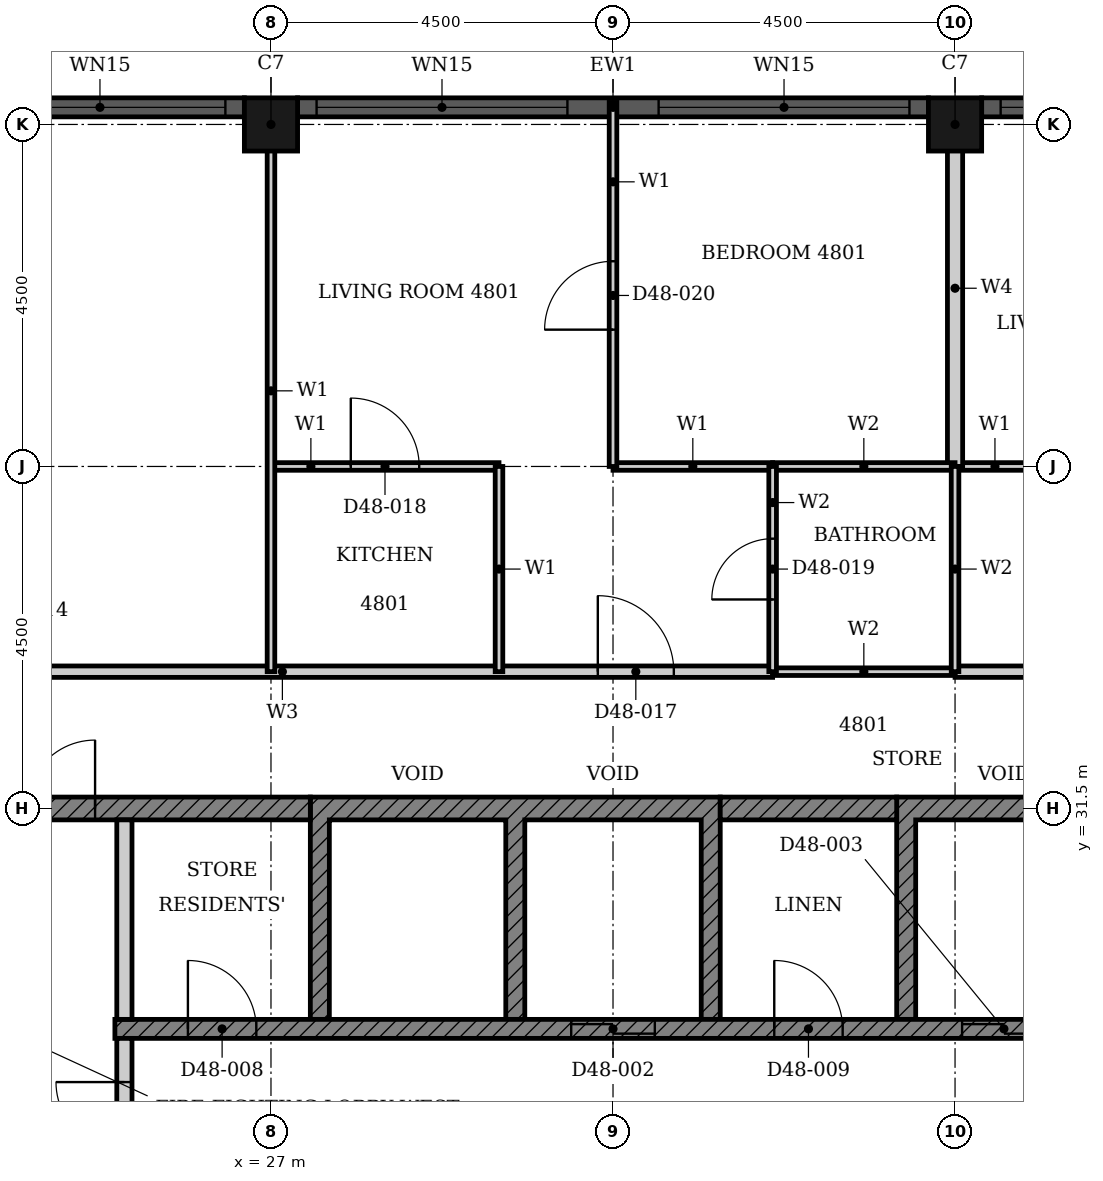
"""IFC4 building model, lengths in metres.
Left out: names, types, materials, properties, quantities, classifications, styles, units other than length and angle.
Written with IfcOpenShell. Run it as: python <this file> out.ifc"""

import sys

from ifc_helpers import new_model, si_unit, direction, frame, frame_2d, origin, origin_2d, place, context, subcontext, project, spatial, polyline, rectangle, hollow_rectangle, outline, extrude, element, fill, save


model = new_model("IFC4")
c1 = context("Model", 3, precision=1e-05, world=origin(), true_north=direction((0.0, 1.0)))
c2 = subcontext(c1, "Body", "Model", "MODEL_VIEW")
j1 = project(units=[si_unit("LENGTHUNIT", "METRE"), si_unit("PLANEANGLEUNIT", "RADIAN")], contexts=[c1])
p1 = place(None, origin())
s1 = spatial("IfcSite", under=j1, at=p1, CompositionType="ELEMENT")
p2 = place(p1, origin())
s2 = spatial("IfcBuilding", under=s1, at=p2, CompositionType="ELEMENT")
p3 = place(p2, frame((0.0, 0.0, 192.4)))
s3 = spatial("IfcBuildingStorey", under=s2, at=p3, CompositionType="ELEMENT", Elevation=192.4)
for number, where, z_axis, x_axis in (
    (1, (36.0, 40.5, 0.0), (0.0, 0.0, 1.0), (1.0, 0.0, 0.0)),
    (2, (27.0, 40.5, 0.0), (0.0, 0.0, 1.0), (1.0, 0.0, 0.0)),
):
    element("IfcColumn", number, at=place(p3, frame(where, z_axis=z_axis, x_axis=x_axis)), inside=s3, PredefinedType="COLUMN", context=c2, shape_type="SweptSolid", body=[
        extrude(hollow_rectangle(XDim=0.7, YDim=0.7, WallThickness=0.022, at=origin_2d()), origin(), (0.0, 0.0, 1.0), 3.7),
    ])
p4 = place(p3, frame((44.65, 40.725, 0.0), z_axis=(0.0, 0.0, 1.0), x_axis=(-1.0, 0.0, 0.0)))
e3 = element("IfcWall", 3, at=p4, inside=s3, PredefinedType="SOLIDWALL", context=c2, shape_type="SweptSolid", body=[
    extrude(rectangle(XDim=8.3, YDim=0.25, at=frame_2d((4.15, 0.0))), origin(), (0.0, 0.0, 1.0), 3.7),
])
p5 = place(p4, frame((0.25, 0.0, 0.45)))
e4 = element("IfcOpeningElement", 4, at=p5, cuts=e3, PredefinedType="OPENING", context=c2, shape_type="SweptSolid", body=[
    extrude(rectangle(XDim=3.3, YDim=2.3, at=frame_2d((1.65, 1.15))), frame((0.0, 0.135, 0.0), z_axis=(0.0, -1.0, 0.0), x_axis=(1.0, 0.0, 0.0)), (0.0, 0.0, 1.0), 0.27),
])
p6 = place(p4, frame((4.75, 0.0, 0.45)))
e5 = element("IfcOpeningElement", 5, at=p6, cuts=e3, PredefinedType="OPENING", context=c2, shape_type="SweptSolid", body=[
    extrude(rectangle(XDim=3.3, YDim=2.3, at=frame_2d((1.65, 1.15))), frame((0.0, 0.135, 0.0), z_axis=(0.0, -1.0, 0.0), x_axis=(1.0, 0.0, 0.0)), (0.0, 0.0, 1.0), 0.27),
])
p7 = place(p3, frame((35.65, 40.725, 0.0), z_axis=(0.0, 0.0, 1.0), x_axis=(-1.0, 0.0, 0.0)))
e6 = element("IfcWall", 6, at=p7, inside=s3, PredefinedType="SOLIDWALL", context=c2, shape_type="SweptSolid", body=[
    extrude(rectangle(XDim=8.3, YDim=0.25, at=frame_2d((4.15, 0.0))), origin(), (0.0, 0.0, 1.0), 3.7),
])
p8 = place(p7, frame((0.25, 0.0, 0.45)))
e7 = element("IfcOpeningElement", 7, at=p8, cuts=e6, PredefinedType="OPENING", context=c2, shape_type="SweptSolid", body=[
    extrude(rectangle(XDim=3.3, YDim=2.3, at=frame_2d((1.65, 1.15))), frame((0.0, 0.135, 0.0), z_axis=(0.0, -1.0, 0.0), x_axis=(1.0, 0.0, 0.0)), (0.0, 0.0, 1.0), 0.27),
])
p9 = place(p7, frame((4.75, 0.0, 0.45)))
e8 = element("IfcOpeningElement", 8, at=p9, cuts=e6, PredefinedType="OPENING", context=c2, shape_type="SweptSolid", body=[
    extrude(rectangle(XDim=3.3, YDim=2.3, at=frame_2d((1.65, 1.15))), frame((0.0, 0.135, 0.0), z_axis=(0.0, -1.0, 0.0), x_axis=(1.0, 0.0, 0.0)), (0.0, 0.0, 1.0), 0.27),
])
p10 = place(p3, frame((26.65, 40.725, 0.0), z_axis=(0.0, 0.0, 1.0), x_axis=(-1.0, 0.0, 0.0)))
e9 = element("IfcWall", 9, at=p10, inside=s3, PredefinedType="SOLIDWALL", context=c2, shape_type="SweptSolid", body=[
    extrude(rectangle(XDim=8.3, YDim=0.25, at=frame_2d((4.15, 0.0))), origin(), (0.0, 0.0, 1.0), 3.7),
])
p11 = place(p10, frame((0.25, 0.0, 0.45)))
e10 = element("IfcOpeningElement", 10, at=p11, cuts=e9, PredefinedType="OPENING", context=c2, shape_type="SweptSolid", body=[
    extrude(rectangle(XDim=3.3, YDim=2.3, at=frame_2d((1.65, 1.15))), frame((0.0, 0.135, 0.0), z_axis=(0.0, -1.0, 0.0), x_axis=(1.0, 0.0, 0.0)), (0.0, 0.0, 1.0), 0.27),
])
p12 = place(p10, frame((4.75, 0.0, 0.45)))
e11 = element("IfcOpeningElement", 11, at=p12, cuts=e9, PredefinedType="OPENING", context=c2, shape_type="SweptSolid", body=[
    extrude(rectangle(XDim=3.3, YDim=2.3, at=frame_2d((1.65, 1.15))), frame((0.0, 0.135, 0.0), z_axis=(0.0, -1.0, 0.0), x_axis=(1.0, 0.0, 0.0)), (0.0, 0.0, 1.0), 0.27),
])
p13 = place(p3, origin())
e12 = element("IfcWall", 12, at=p13, inside=s3, PredefinedType="SHEAR", context=c2, shape_type="SweptSolid", body=[
    extrude(outline(polyline([(27.518, 28.725), (27.768, 28.725), (27.768, 31.35), (30.089, 31.35), (30.089, 28.725), (30.339, 28.725), (30.339, 31.35), (32.661, 31.35), (32.661, 28.725), (32.911, 28.725), (32.911, 31.65), (27.518, 31.65), (27.518, 28.725)])), origin(), (0.0, 0.0, 1.0), 3.4),
])
p14 = place(p3, origin())
e13 = element("IfcWall", 13, at=p14, inside=s3, PredefinedType="SHEAR", context=c2, shape_type="SweptSolid", body=[
    extrude(outline(polyline([(35.232, 28.725), (35.482, 28.725), (35.482, 31.35), (37.803, 31.35), (37.803, 28.725), (38.053, 28.725), (38.053, 31.35), (40.375, 31.35), (40.375, 28.725), (40.625, 28.725), (40.625, 31.65), (35.232, 31.65), (35.232, 28.725)])), origin(), (0.0, 0.0, 1.0), 3.4),
])
p15 = place(p3, frame((18.15, 31.5, 0.0), z_axis=(0.0, 0.0, 1.0), x_axis=(1.0, 0.0, 0.0)))
e14 = element("IfcWall", 14, at=p15, inside=s3, PredefinedType="SHEAR", context=c2, shape_type="SweptSolid", body=[
    extrude(rectangle(XDim=9.368, YDim=0.3, at=frame_2d((4.684, 0.0))), origin(), (0.0, 0.0, 1.0), 3.4),
])
p16 = place(p15, frame((4.736, 0.0, 0.0)))
e15 = element("IfcOpeningElement", 15, at=p16, cuts=e14, PredefinedType="OPENING", context=c2, shape_type="SweptSolid", body=[
    extrude(rectangle(XDim=1.8, YDim=2.1, at=frame_2d((0.9, 1.05))), frame((0.0, 0.16, 0.0), z_axis=(0.0, -1.0, 0.0), x_axis=(1.0, 0.0, 0.0)), (0.0, 0.0, 1.0), 0.32),
])
p17 = place(p3, frame((32.911, 31.5, 0.0), z_axis=(0.0, 0.0, 1.0), x_axis=(1.0, 0.0, 0.0)))
e16 = element("IfcWall", 16, at=p17, inside=s3, PredefinedType="SHEAR", context=c2, shape_type="SweptSolid", body=[
    extrude(rectangle(XDim=2.322, YDim=0.3, at=frame_2d((1.161, 0.0))), origin(), (0.0, 0.0, 1.0), 3.4),
])
p18 = place(p3, frame((24.947, 28.6, 0.0), z_axis=(0.0, 0.0, 1.0), x_axis=(1.0, 0.0, 0.0)))
e17 = element("IfcWall", 17, at=p18, inside=s3, PredefinedType="SHEAR", context=c2, shape_type="SweptSolid", body=[
    extrude(rectangle(XDim=15.678, YDim=0.25, at=frame_2d((7.839, 0.0))), origin(), (0.0, 0.0, 1.0), 3.4),
])
p19 = place(p18, frame((6.004, 0.0, 0.0)))
e18 = element("IfcOpeningElement", 18, at=p19, cuts=e17, PredefinedType="OPENING", context=c2, shape_type="SweptSolid", body=[
    extrude(rectangle(XDim=1.1, YDim=2.1, at=frame_2d((0.55, 1.05))), frame((0.0, 0.135, 0.0), z_axis=(0.0, -1.0, 0.0), x_axis=(1.0, 0.0, 0.0)), (0.0, 0.0, 1.0), 0.27),
])
p20 = place(p18, frame((11.146, 0.0, 0.0)))
e19 = element("IfcOpeningElement", 19, at=p20, cuts=e17, PredefinedType="OPENING", context=c2, shape_type="SweptSolid", body=[
    extrude(rectangle(XDim=1.1, YDim=2.1, at=frame_2d((0.55, 1.05))), frame((0.0, 0.135, 0.0), z_axis=(0.0, -1.0, 0.0), x_axis=(1.0, 0.0, 0.0)), (0.0, 0.0, 1.0), 0.27),
])
p21 = place(p18, frame((13.718, 0.0, 0.0)))
e20 = element("IfcOpeningElement", 20, at=p21, cuts=e17, PredefinedType="OPENING", context=c2, shape_type="SweptSolid", body=[
    extrude(rectangle(XDim=1.1, YDim=2.1, at=frame_2d((0.55, 1.05))), frame((0.0, 0.135, 0.0), z_axis=(0.0, -1.0, 0.0), x_axis=(1.0, 0.0, 0.0)), (0.0, 0.0, 1.0), 0.27),
])
p22 = place(p18, frame((0.961, 0.0, 0.0)))
e21 = element("IfcOpeningElement", 21, at=p22, cuts=e17, PredefinedType="OPENING", context=c2, shape_type="SweptSolid", body=[
    extrude(rectangle(XDim=0.9, YDim=2.1, at=frame_2d((0.45, 1.05))), frame((0.0, 0.135, 0.0), z_axis=(0.0, -1.0, 0.0), x_axis=(1.0, 0.0, 0.0)), (0.0, 0.0, 1.0), 0.27),
])
p23 = place(p18, frame((8.675, 0.0, 0.0)))
e22 = element("IfcOpeningElement", 22, at=p23, cuts=e17, PredefinedType="OPENING", context=c2, shape_type="SweptSolid", body=[
    extrude(rectangle(XDim=0.9, YDim=2.1, at=frame_2d((0.45, 1.05))), frame((0.0, 0.135, 0.0), z_axis=(0.0, -1.0, 0.0), x_axis=(1.0, 0.0, 0.0)), (0.0, 0.0, 1.0), 0.27),
])
p24 = place(p3, frame((25.072, 28.725, 0.0), z_axis=(0.0, 0.0, 1.0), x_axis=(0.0, 1.0, 0.0)))
e23 = element("IfcWall", 23, at=p24, inside=s3, PredefinedType="PARTITIONING", context=c2, shape_type="SweptSolid", body=[
    extrude(rectangle(XDim=2.625, YDim=0.2, at=frame_2d((1.312, 0.0))), origin(), (0.0, 0.0, 1.0), 3.4),
])
p25 = place(p3, frame((25.072, 25.525, 0.0), z_axis=(0.0, 0.0, 1.0), x_axis=(0.0, 1.0, 0.0)))
e24 = element("IfcWall", 24, at=p25, inside=s3, PredefinedType="PARTITIONING", context=c2, shape_type="SweptSolid", body=[
    extrude(rectangle(XDim=2.95, YDim=0.2, at=frame_2d((1.475, 0.0))), origin(), (0.0, 0.0, 1.0), 3.4),
])
p26 = place(p25, frame((0.575, 0.0, 0.0)))
e25 = element("IfcOpeningElement", 25, at=p26, cuts=e24, PredefinedType="OPENING", context=c2, shape_type="SweptSolid", body=[
    extrude(rectangle(XDim=1.8, YDim=2.1, at=frame_2d((0.9, 1.05))), frame((0.0, 0.11, 0.0), z_axis=(0.0, -1.0, 0.0), x_axis=(1.0, 0.0, 0.0)), (0.0, 0.0, 1.0), 0.22),
])
p27 = place(p3, frame((18.0, 33.3, 0.0), z_axis=(0.0, 0.0, 1.0), x_axis=(1.0, 0.0, 0.0)))
e26 = element("IfcWall", 26, at=p27, inside=s3, PredefinedType="PARTITIONING", context=c2, shape_type="SweptSolid", body=[
    extrude(rectangle(XDim=15.6, YDim=0.15, at=frame_2d((7.8, 0.0))), origin(), (0.0, 0.0, 1.0), 3.4),
])
p28 = place(p27, frame((4.0, 0.0, 0.0)))
e27 = element("IfcOpeningElement", 27, at=p28, cuts=e26, PredefinedType="OPENING", context=c2, shape_type="SweptSolid", body=[
    extrude(rectangle(XDim=1.0, YDim=2.1, at=frame_2d((0.5, 1.05))), frame((0.0, 0.085, 0.0), z_axis=(0.0, -1.0, 0.0), x_axis=(1.0, 0.0, 0.0)), (0.0, 0.0, 1.0), 0.17),
])
p29 = place(p27, frame((13.3, 0.0, 0.0)))
e28 = element("IfcOpeningElement", 28, at=p29, cuts=e26, PredefinedType="OPENING", context=c2, shape_type="SweptSolid", body=[
    extrude(rectangle(XDim=1.0, YDim=2.2, at=frame_2d((0.5, 1.1))), frame((0.0, 0.085, 0.0), z_axis=(0.0, -1.0, 0.0), x_axis=(1.0, 0.0, 0.0)), (0.0, 0.0, 1.0), 0.17),
])
p30 = place(p3, frame((36.0, 33.3, 0.0), z_axis=(0.0, 0.0, 1.0), x_axis=(1.0, 0.0, 0.0)))
e29 = element("IfcWall", 29, at=p30, inside=s3, PredefinedType="PARTITIONING", context=c2, shape_type="SweptSolid", body=[
    extrude(rectangle(XDim=6.6, YDim=0.15, at=frame_2d((3.3, 0.0))), origin(), (0.0, 0.0, 1.0), 3.4),
])
p31 = place(p30, frame((4.3, 0.0, 0.0)))
e30 = element("IfcOpeningElement", 30, at=p31, cuts=e29, PredefinedType="OPENING", context=c2, shape_type="SweptSolid", body=[
    extrude(rectangle(XDim=1.0, YDim=2.2, at=frame_2d((0.5, 1.1))), frame((0.0, 0.085, 0.0), z_axis=(0.0, -1.0, 0.0), x_axis=(1.0, 0.0, 0.0)), (0.0, 0.0, 1.0), 0.17),
])
p32 = place(p3, frame((31.5, 36.0, 0.0), z_axis=(0.0, 0.0, 1.0), x_axis=(1.0, 0.0, 0.0)))
e31 = element("IfcWall", 31, at=p32, inside=s3, PredefinedType="PARTITIONING", context=c2, shape_type="SweptSolid", body=[
    extrude(rectangle(XDim=2.1, YDim=0.1, at=frame_2d((1.05, 0.0))), origin(), (0.0, 0.0, 1.0), 3.4),
])
p33 = place(p3, frame((27.0, 36.0, 0.0), z_axis=(0.0, 0.0, 1.0), x_axis=(1.0, 0.0, 0.0)))
e32 = element("IfcWall", 32, at=p33, inside=s3, PredefinedType="PARTITIONING", context=c2, shape_type="SweptSolid", body=[
    extrude(rectangle(XDim=3.0, YDim=0.1, at=frame_2d((1.5, 0.0))), origin(), (0.0, 0.0, 1.0), 3.4),
])
p34 = place(p33, frame((1.05, 0.0, 0.0)))
e33 = element("IfcOpeningElement", 33, at=p34, cuts=e32, PredefinedType="OPENING", context=c2, shape_type="SweptSolid", body=[
    extrude(rectangle(XDim=0.9, YDim=2.1, at=frame_2d((0.45, 1.05))), frame((0.0, 0.06, 0.0), z_axis=(0.0, -1.0, 0.0), x_axis=(1.0, 0.0, 0.0)), (0.0, 0.0, 1.0), 0.12),
])
p35 = place(p3, frame((36.0, 36.0, 0.0), z_axis=(0.0, 0.0, 1.0), x_axis=(1.0, 0.0, 0.0)))
e34 = element("IfcWall", 34, at=p35, inside=s3, PredefinedType="PARTITIONING", context=c2, shape_type="SweptSolid", body=[
    extrude(rectangle(XDim=3.0, YDim=0.1, at=frame_2d((1.5, 0.0))), origin(), (0.0, 0.0, 1.0), 3.4),
])
p36 = place(p35, frame((1.05, 0.0, 0.0)))
e35 = element("IfcOpeningElement", 35, at=p36, cuts=e34, PredefinedType="OPENING", context=c2, shape_type="SweptSolid", body=[
    extrude(rectangle(XDim=0.9, YDim=2.1, at=frame_2d((0.45, 1.05))), frame((0.0, 0.06, 0.0), z_axis=(0.0, -1.0, 0.0), x_axis=(1.0, 0.0, 0.0)), (0.0, 0.0, 1.0), 0.12),
])
p37 = place(p3, frame((27.0, 33.3, 0.0), z_axis=(0.0, 0.0, 1.0), x_axis=(0.0, 1.0, 0.0)))
e36 = element("IfcWall", 36, at=p37, inside=s3, PredefinedType="PARTITIONING", context=c2, shape_type="SweptSolid", body=[
    extrude(rectangle(XDim=7.39, YDim=0.1, at=frame_2d((3.695, 0.0))), origin(), (0.0, 0.0, 1.0), 3.4),
])
p38 = place(p3, frame((30.0, 33.3, 0.0), z_axis=(0.0, 0.0, 1.0), x_axis=(0.0, 1.0, 0.0)))
e37 = element("IfcWall", 37, at=p38, inside=s3, PredefinedType="PARTITIONING", context=c2, shape_type="SweptSolid", body=[
    extrude(rectangle(XDim=2.7, YDim=0.1, at=frame_2d((1.35, 0.0))), origin(), (0.0, 0.0, 1.0), 3.4),
])
p39 = place(p3, frame((31.5, 36.0, 0.0), z_axis=(0.0, 0.0, 1.0), x_axis=(0.0, 1.0, 0.0)))
e38 = element("IfcWall", 38, at=p39, inside=s3, PredefinedType="PARTITIONING", context=c2, shape_type="SweptSolid", body=[
    extrude(rectangle(XDim=4.79, YDim=0.1, at=frame_2d((2.395, 0.0))), origin(), (0.0, 0.0, 1.0), 3.4),
])
p40 = place(p39, frame((1.8, 0.0, 0.0)))
e39 = element("IfcOpeningElement", 39, at=p40, cuts=e38, PredefinedType="OPENING", context=c2, shape_type="SweptSolid", body=[
    extrude(rectangle(XDim=0.9, YDim=2.1, at=frame_2d((0.45, 1.05))), frame((0.0, 0.06, 0.0), z_axis=(0.0, -1.0, 0.0), x_axis=(1.0, 0.0, 0.0)), (0.0, 0.0, 1.0), 0.12),
])
p41 = place(p3, frame((36.0, 36.0, 0.0), z_axis=(0.0, 0.0, 1.0), x_axis=(0.0, 1.0, 0.0)))
e40 = element("IfcWall", 40, at=p41, inside=s3, PredefinedType="PARTITIONING", context=c2, shape_type="SweptSolid", body=[
    extrude(rectangle(XDim=4.69, YDim=0.2, at=frame_2d((2.345, 0.0))), origin(), (0.0, 0.0, 1.0), 3.4),
])
for number, where, z_axis, x_axis in (
    (41, (33.6, 33.3, 0.0), (0.0, 0.0, 1.0), (1.0, 0.0, 0.0)),
    (42, (33.6, 36.0, 0.0), (0.0, 0.0, 1.0), (1.0, 0.0, 0.0)),
):
    element("IfcWall", number, at=place(p3, frame(where, z_axis=z_axis, x_axis=x_axis)), inside=s3, PredefinedType="PARTITIONING", context=c2, shape_type="SweptSolid", body=[
        extrude(rectangle(XDim=2.4, YDim=0.1, at=frame_2d((1.2, 0.0))), origin(), (0.0, 0.0, 1.0), 3.4),
    ])
p42 = place(p3, frame((33.6, 33.3, 0.0), z_axis=(0.0, 0.0, 1.0), x_axis=(0.0, 1.0, 0.0)))
e43 = element("IfcWall", 43, at=p42, inside=s3, PredefinedType="PARTITIONING", context=c2, shape_type="SweptSolid", body=[
    extrude(rectangle(XDim=2.7, YDim=0.1, at=frame_2d((1.35, 0.0))), origin(), (0.0, 0.0, 1.0), 3.4),
])
p43 = place(p42, frame((0.95, 0.0, 0.0)))
e44 = element("IfcOpeningElement", 44, at=p43, cuts=e43, PredefinedType="OPENING", context=c2, shape_type="SweptSolid", body=[
    extrude(rectangle(XDim=0.8, YDim=2.1, at=frame_2d((0.4, 1.05))), frame((0.0, 0.06, 0.0), z_axis=(0.0, -1.0, 0.0), x_axis=(1.0, 0.0, 0.0)), (0.0, 0.0, 1.0), 0.12),
])
p44 = place(p3, frame((36.0, 33.3, 0.0), z_axis=(0.0, 0.0, 1.0), x_axis=(0.0, 1.0, 0.0)))
e45 = element("IfcWall", 45, at=p44, inside=s3, PredefinedType="PARTITIONING", context=c2, shape_type="SweptSolid", body=[
    extrude(rectangle(XDim=2.7, YDim=0.1, at=frame_2d((1.35, 0.0))), origin(), (0.0, 0.0, 1.0), 3.4),
])
p45 = place(p6, origin())
e46 = element("IfcWindow", 46, at=p45, inside=s3, PartitioningType="SINGLE_PANEL", PredefinedType="WINDOW", context=c2, shape_type="SweptSolid", body=[
    extrude(rectangle(XDim=3.3, YDim=2.3, at=frame_2d((1.65, 1.15))), frame((0.0, 0.03, 0.0), z_axis=(0.0, -1.0, 0.0), x_axis=(1.0, 0.0, 0.0)), (0.0, 0.0, 1.0), 0.06),
])
fill(e5, e46)
p46 = place(p8, origin())
e47 = element("IfcWindow", 47, at=p46, inside=s3, PartitioningType="SINGLE_PANEL", PredefinedType="WINDOW", context=c2, shape_type="SweptSolid", body=[
    extrude(rectangle(XDim=3.3, YDim=2.3, at=frame_2d((1.65, 1.15))), frame((0.0, 0.03, 0.0), z_axis=(0.0, -1.0, 0.0), x_axis=(1.0, 0.0, 0.0)), (0.0, 0.0, 1.0), 0.06),
])
fill(e7, e47)
p47 = place(p9, origin())
e48 = element("IfcWindow", 48, at=p47, inside=s3, PartitioningType="SINGLE_PANEL", PredefinedType="WINDOW", context=c2, shape_type="SweptSolid", body=[
    extrude(rectangle(XDim=3.3, YDim=2.3, at=frame_2d((1.65, 1.15))), frame((0.0, 0.03, 0.0), z_axis=(0.0, -1.0, 0.0), x_axis=(1.0, 0.0, 0.0)), (0.0, 0.0, 1.0), 0.06),
])
fill(e8, e48)
p48 = place(p11, origin())
e49 = element("IfcWindow", 49, at=p48, inside=s3, PartitioningType="SINGLE_PANEL", PredefinedType="WINDOW", context=c2, shape_type="SweptSolid", body=[
    extrude(rectangle(XDim=3.3, YDim=2.3, at=frame_2d((1.65, 1.15))), frame((0.0, 0.03, 0.0), z_axis=(0.0, -1.0, 0.0), x_axis=(1.0, 0.0, 0.0)), (0.0, 0.0, 1.0), 0.06),
])
fill(e10, e49)
p49 = place(p19, origin())
e50 = element("IfcDoor", 50, at=p49, inside=s3, OperationType="DOUBLE_DOOR_SLIDING", PredefinedType="DOOR", context=c2, shape_type="SweptSolid", body=[
    extrude(rectangle(XDim=1.1, YDim=2.1, at=frame_2d((0.55, 1.05))), frame((0.0, 0.025, 0.0), z_axis=(0.0, -1.0, 0.0), x_axis=(1.0, 0.0, 0.0)), (0.0, 0.0, 1.0), 0.05),
])
fill(e18, e50)
p50 = place(p20, origin())
e51 = element("IfcDoor", 51, at=p50, inside=s3, OperationType="DOUBLE_DOOR_SLIDING", PredefinedType="DOOR", context=c2, shape_type="SweptSolid", body=[
    extrude(rectangle(XDim=1.1, YDim=2.1, at=frame_2d((0.55, 1.05))), frame((0.0, 0.025, 0.0), z_axis=(0.0, -1.0, 0.0), x_axis=(1.0, 0.0, 0.0)), (0.0, 0.0, 1.0), 0.05),
])
fill(e19, e51)
p51 = place(p22, origin())
e52 = element("IfcDoor", 52, at=p51, inside=s3, OperationType="SINGLE_SWING_LEFT", PredefinedType="DOOR", context=c2, shape_type="SweptSolid", body=[
    extrude(rectangle(XDim=0.9, YDim=2.1, at=frame_2d((0.45, 1.05))), frame((0.0, 0.025, 0.0), z_axis=(0.0, -1.0, 0.0), x_axis=(1.0, 0.0, 0.0)), (0.0, 0.0, 1.0), 0.05),
])
fill(e21, e52)
p52 = place(p23, origin())
e53 = element("IfcDoor", 53, at=p52, inside=s3, OperationType="SINGLE_SWING_LEFT", PredefinedType="DOOR", context=c2, shape_type="SweptSolid", body=[
    extrude(rectangle(XDim=0.9, YDim=2.1, at=frame_2d((0.45, 1.05))), frame((0.0, 0.025, 0.0), z_axis=(0.0, -1.0, 0.0), x_axis=(1.0, 0.0, 0.0)), (0.0, 0.0, 1.0), 0.05),
])
fill(e22, e53)
p53 = place(p26, origin())
e54 = element("IfcDoor", 54, at=p53, inside=s3, OperationType="DOUBLE_DOOR_SINGLE_SWING", PredefinedType="DOOR", context=c2, shape_type="SweptSolid", body=[
    extrude(rectangle(XDim=1.8, YDim=2.1, at=frame_2d((0.9, 1.05))), frame((0.0, 0.025, 0.0), z_axis=(0.0, -1.0, 0.0), x_axis=(1.0, 0.0, 0.0)), (0.0, 0.0, 1.0), 0.05),
])
fill(e25, e54)
p54 = place(p16, origin())
e55 = element("IfcDoor", 55, at=p54, inside=s3, OperationType="DOUBLE_DOOR_SINGLE_SWING", PredefinedType="DOOR", context=c2, shape_type="SweptSolid", body=[
    extrude(rectangle(XDim=1.8, YDim=2.1, at=frame_2d((0.9, 1.05))), frame((0.0, 0.025, 0.0), z_axis=(0.0, -1.0, 0.0), x_axis=(1.0, 0.0, 0.0)), (0.0, 0.0, 1.0), 0.05),
])
fill(e15, e55)
p55 = place(p29, origin())
e56 = element("IfcDoor", 56, at=p55, inside=s3, OperationType="SINGLE_SWING_RIGHT", PredefinedType="DOOR", context=c2, shape_type="SweptSolid", body=[
    extrude(rectangle(XDim=1.0, YDim=2.2, at=frame_2d((0.5, 1.1))), frame((0.0, 0.025, 0.0), z_axis=(0.0, -1.0, 0.0), x_axis=(1.0, 0.0, 0.0)), (0.0, 0.0, 1.0), 0.05),
])
fill(e28, e56)
p56 = place(p34, origin())
e57 = element("IfcDoor", 57, at=p56, inside=s3, OperationType="SINGLE_SWING_LEFT", PredefinedType="DOOR", context=c2, shape_type="SweptSolid", body=[
    extrude(rectangle(XDim=0.9, YDim=2.1, at=frame_2d((0.45, 1.05))), frame((0.0, 0.025, 0.0), z_axis=(0.0, -1.0, 0.0), x_axis=(1.0, 0.0, 0.0)), (0.0, 0.0, 1.0), 0.05),
])
fill(e33, e57)
p57 = place(p43, origin())
e58 = element("IfcDoor", 58, at=p57, inside=s3, OperationType="SINGLE_SWING_LEFT", PredefinedType="DOOR", context=c2, shape_type="SweptSolid", body=[
    extrude(rectangle(XDim=0.8, YDim=2.1, at=frame_2d((0.4, 1.05))), frame((0.0, 0.025, 0.0), z_axis=(0.0, -1.0, 0.0), x_axis=(1.0, 0.0, 0.0)), (0.0, 0.0, 1.0), 0.05),
])
fill(e44, e58)
p58 = place(p40, origin())
e59 = element("IfcDoor", 59, at=p58, inside=s3, OperationType="SINGLE_SWING_LEFT", PredefinedType="DOOR", context=c2, shape_type="SweptSolid", body=[
    extrude(rectangle(XDim=0.9, YDim=2.1, at=frame_2d((0.45, 1.05))), frame((0.0, 0.025, 0.0), z_axis=(0.0, -1.0, 0.0), x_axis=(1.0, 0.0, 0.0)), (0.0, 0.0, 1.0), 0.05),
])
fill(e39, e59)
save(model, sys.argv[1])
